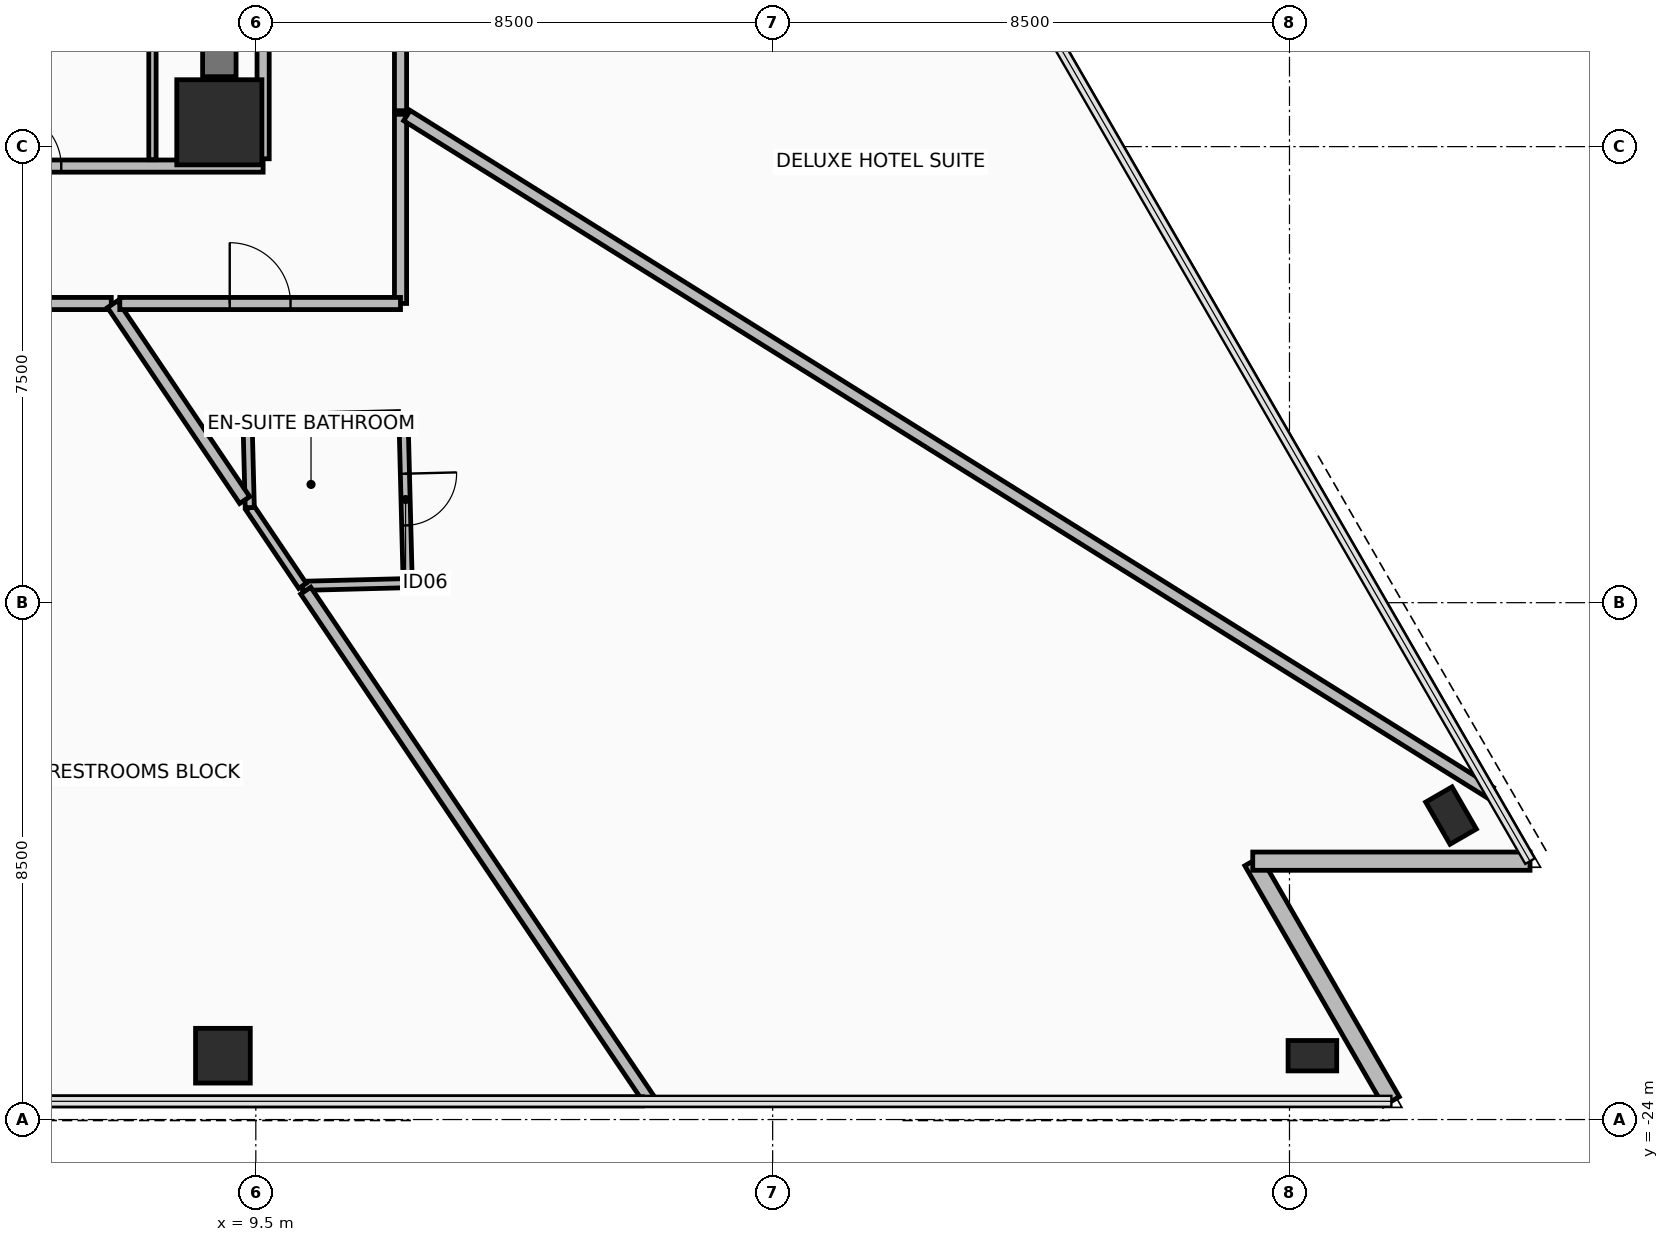
"""IFC4 building model, lengths in metres.
Left out: names, types, materials, properties, quantities, classifications, styles, units other than length and angle.
Written with IfcOpenShell. Run it as: python <this file> out.ifc"""

import sys

from ifc_helpers import new_model, si_unit, direction, frame, frame_2d, origin, origin_2d, place, context, subcontext, project, spatial, rectangle, hollow_rectangle, extrude, element, fill, save


model = new_model("IFC4")
c1 = context("Model", 3, precision=1e-05, world=origin(), true_north=direction((0.0, 1.0)))
c2 = subcontext(c1, "Body", "Model", "MODEL_VIEW")
j1 = project(units=[si_unit("LENGTHUNIT", "METRE"), si_unit("PLANEANGLEUNIT", "RADIAN")], contexts=[c1])
p1 = place(None, origin())
s1 = spatial("IfcSite", under=j1, at=p1, CompositionType="ELEMENT")
p2 = place(p1, origin())
s2 = spatial("IfcBuilding", under=s1, at=p2, CompositionType="ELEMENT")
p3 = place(p2, frame((0.0, 0.0, 35.25)))
s3 = spatial("IfcBuildingStorey", under=s2, at=p3, CompositionType="ELEMENT", Elevation=35.25)
p4 = place(p3, frame((8.9, -7.6, 0.0), z_axis=(0.0, 0.0, 1.0), x_axis=(1.0, 0.0, 0.0)))
e1 = element("IfcColumn", 1, at=p4, inside=s3, PredefinedType="COLUMN", context=c2, shape_type="SweptSolid", body=[
    extrude(rectangle(XDim=1.4, YDim=1.4, at=origin_2d()), origin(), (0.0, 0.0, 1.0), 3.4),
])
p5 = place(p3, frame((8.959, -22.95, 0.0), z_axis=(0.0, 0.0, 1.0), x_axis=(1.0, 0.0, 0.0)))
e2 = element("IfcColumn", 2, at=p5, inside=s3, PredefinedType="COLUMN", context=c2, shape_type="SweptSolid", body=[
    extrude(hollow_rectangle(XDim=0.9, YDim=0.9, WallThickness=0.05, at=origin_2d()), origin(), (0.0, 0.0, 1.0), 3.4),
])
for number, where, z_axis, x_axis in (
    (3, (26.877, -22.95, 0.0), (0.0, 0.0, 1.0), (1.0, 0.0, 0.0)),
    (4, (29.157, -19.001, 0.0), (0.0, 0.0, 1.0), (-0.5, 0.866, 0.0)),
):
    element("IfcColumn", number, at=place(p3, frame(where, z_axis=z_axis, x_axis=x_axis)), inside=s3, PredefinedType="COLUMN", context=c2, shape_type="SweptSolid", body=[
        extrude(hollow_rectangle(XDim=0.5, YDim=0.8, WallThickness=0.04, at=origin_2d()), origin(), (0.0, 0.0, 1.0), 3.4),
    ])
p6 = place(p3, frame((28.176, -23.7, 0.0), z_axis=(0.0, 0.0, 1.0), x_axis=(-0.500014431597, 0.866017071537, 0.0)))
e5 = element("IfcWall", 5, at=p6, inside=s3, PredefinedType="STANDARD", context=c2, shape_type="SweptSolid", body=[
    extrude(rectangle(XDim=4.56, YDim=0.3, at=frame_2d((2.28, 0.0))), origin(), (0.0, 0.0, 1.0), 2.42),
])
p7 = place(p3, frame((25.896, -19.751, 0.0), z_axis=(0.0, 0.0, 1.0), x_axis=(1.0, 0.0, 0.0)))
e6 = element("IfcWall", 6, at=p7, inside=s3, PredefinedType="STANDARD", context=c2, shape_type="SweptSolid", body=[
    extrude(rectangle(XDim=4.56, YDim=0.3, at=frame_2d((2.28, 0.0))), origin(), (0.0, 0.0, 1.0), 2.42),
])
p8 = place(p3, frame((8.9, -6.85, 0.0), z_axis=(0.0, 0.0, 1.0), x_axis=(0.0, 1.0, 0.0)))
e7 = element("IfcWall", 7, at=p8, inside=s3, PredefinedType="SHEAR", context=c2, shape_type="SweptSolid", body=[
    extrude(rectangle(XDim=10.7, YDim=0.55, at=frame_2d((5.35, 0.0))), origin(), (0.0, 0.0, 1.0), 3.225),
])
p9 = place(p3, frame((-9.62, -8.32, 0.0), z_axis=(0.0, 0.0, 1.0), x_axis=(1.0, 0.0, 0.0)))
e8 = element("IfcWall", 8, at=p9, inside=s3, PredefinedType="PARTITIONING", context=c2, shape_type="SweptSolid", body=[
    extrude(rectangle(XDim=19.24, YDim=0.2, at=frame_2d((9.62, 0.0))), origin(), (0.0, 0.0, 1.0), 2.62),
])
p10 = place(p9, frame((15.02, 0.0, 0.0)))
e9 = element("IfcOpeningElement", 9, at=p10, cuts=e8, PredefinedType="OPENING", context=c2, shape_type="SweptSolid", body=[
    extrude(rectangle(XDim=0.9, YDim=2.1, at=frame_2d((0.45, 1.05))), frame((0.0, 0.11, 0.0), z_axis=(0.0, -1.0, 0.0), x_axis=(1.0, 0.0, 0.0)), (0.0, 0.0, 1.0), 0.22),
])
p11 = place(p3, frame((9.62, -8.2, 0.0), z_axis=(0.0, 0.0, 1.0), x_axis=(0.0, 1.0, 0.0)))
e10 = element("IfcWall", 10, at=p11, inside=s3, PredefinedType="PARTITIONING", context=c2, shape_type="SweptSolid", body=[
    extrude(rectangle(XDim=16.4, YDim=0.2, at=frame_2d((8.2, 0.0))), origin(), (0.0, 0.0, 1.0), 2.62),
])
p12 = place(p11, frame((12.65, 0.0, 0.0)))
e11 = element("IfcOpeningElement", 11, at=p12, cuts=e10, PredefinedType="OPENING", context=c2, shape_type="SweptSolid", body=[
    extrude(rectangle(XDim=1.1, YDim=2.15, at=frame_2d((0.55, 1.075))), frame((0.0, 0.11, 0.0), z_axis=(0.0, -1.0, 0.0), x_axis=(1.0, 0.0, 0.0)), (0.0, 0.0, 1.0), 0.22),
])
p13 = place(p3, frame((7.8, -8.215, 0.0), z_axis=(0.0, 0.0, 1.0), x_axis=(0.0, 1.0, 0.0)))
e12 = element("IfcWall", 12, at=p13, inside=s3, PredefinedType="PARTITIONING", context=c2, shape_type="SweptSolid", body=[
    extrude(rectangle(XDim=4.015, YDim=0.12, at=frame_2d((2.008, 0.0))), origin(), (0.0, 0.0, 1.0), 2.42),
])
p14 = place(p3, frame((11.927, -12.429, 0.0), z_axis=(0.0, 0.0, 1.0), x_axis=(0.025746347005, -0.999668507864, 0.0)))
e13 = element("IfcWall", 13, at=p14, inside=s3, PredefinedType="PARTITIONING", context=c2, shape_type="SweptSolid", body=[
    extrude(rectangle(XDim=2.75, YDim=0.15, at=frame_2d((1.375, 0.0))), origin(), (0.0, 0.0, 1.0), 2.82),
])
p15 = place(p14, frame((0.95, 0.0, 0.0)))
e14 = element("IfcOpeningElement", 14, at=p15, cuts=e13, PredefinedType="OPENING", context=c2, shape_type="SweptSolid", body=[
    extrude(rectangle(XDim=0.85, YDim=2.1, at=frame_2d((0.425, 1.05))), frame((0.0, 0.085, 0.0), z_axis=(0.0, -1.0, 0.0), x_axis=(1.0, 0.0, 0.0)), (0.0, 0.0, 1.0), 0.17),
])
p16 = place(p3, frame((11.998, -15.178, 0.0), z_axis=(0.0, 0.0, 1.0), x_axis=(-0.999670410654, -0.025672359918, 0.0)))
e15 = element("IfcWall", 15, at=p16, inside=s3, PredefinedType="PARTITIONING", context=c2, shape_type="SweptSolid", body=[
    extrude(rectangle(XDim=1.731, YDim=0.15, at=frame_2d((0.865, 0.0))), origin(), (0.0, 0.0, 1.0), 3.225),
])
p17 = place(p3, frame((10.268, -15.223, 0.0), z_axis=(0.0, 0.0, 1.0), x_axis=(-0.559229675695, 0.82901276819, 0.0)))
e16 = element("IfcWall", 16, at=p17, inside=s3, PredefinedType="PARTITIONING", context=c2, shape_type="SweptSolid", body=[
    extrude(rectangle(XDim=1.552, YDim=0.15, at=frame_2d((0.776, 0.0))), origin(), (0.0, 0.0, 1.0), 2.82),
])
p18 = place(p3, frame((9.4, -13.936, 0.0), z_axis=(0.0, 0.0, 1.0), x_axis=(-0.025745445057, 0.999668531094, 0.0)))
e17 = element("IfcWall", 17, at=p18, inside=s3, PredefinedType="PARTITIONING", context=c2, shape_type="SweptSolid", body=[
    extrude(rectangle(XDim=1.441, YDim=0.15, at=frame_2d((0.721, 0.0))), origin(), (0.0, 0.0, 1.0), 3.225),
])
p19 = place(p3, frame((9.443, -12.493, 0.0), z_axis=(0.0, 0.0, 1.0), x_axis=(0.999667618691, 0.025780848324, 0.0)))
e18 = element("IfcWall", 18, at=p19, inside=s3, PredefinedType="PARTITIONING", context=c2, shape_type="SweptSolid", body=[
    extrude(rectangle(XDim=2.405, YDim=0.15, at=frame_2d((1.203, 0.0))), origin(), (0.0, 0.0, 1.0), 3.225),
])
p20 = place(p3, frame((1.516, -10.58, 0.0), z_axis=(0.0, 0.0, 1.0), x_axis=(1.0, 0.0, 0.0)))
e19 = element("IfcWall", 19, at=p20, inside=s3, PredefinedType="PARTITIONING", context=c2, shape_type="SweptSolid", body=[
    extrude(rectangle(XDim=5.607, YDim=0.2, at=frame_2d((2.804, 0.0))), origin(), (0.0, 0.0, 1.0), 3.225),
])
p21 = place(p20, frame((2.379, 0.0, 0.0)))
e20 = element("IfcOpeningElement", 20, at=p21, cuts=e19, PredefinedType="OPENING", context=c2, shape_type="SweptSolid", body=[
    extrude(rectangle(XDim=0.85, YDim=2.1, at=frame_2d((0.425, 1.05))), frame((0.0, 0.11, 0.0), z_axis=(0.0, -1.0, 0.0), x_axis=(1.0, 0.0, 0.0)), (0.0, 0.0, 1.0), 0.22),
])
p22 = place(p3, frame((7.144, -10.591, 0.0), z_axis=(0.0, 0.0, 1.0), x_axis=(0.559171794076, -0.829051810631, 0.0)))
e21 = element("IfcWall", 21, at=p22, inside=s3, PredefinedType="PARTITIONING", context=c2, shape_type="SweptSolid", body=[
    extrude(rectangle(XDim=3.886, YDim=0.2, at=frame_2d((1.943, 0.0))), origin(), (0.0, 0.0, 1.0), 2.62),
])
p23 = place(p3, frame((10.321, -15.302, 0.0), z_axis=(0.0, 0.0, 1.0), x_axis=(0.559202536063, -0.829031075208, 0.0)))
e22 = element("IfcWall", 22, at=p23, inside=s3, PredefinedType="PARTITIONING", context=c2, shape_type="SweptSolid", body=[
    extrude(rectangle(XDim=10.13, YDim=0.2, at=frame_2d((5.065, 0.0))), origin(), (0.0, 0.0, 1.0), 2.42),
])
p24 = place(p3, frame((15.859, -23.7, 0.0), z_axis=(0.0, 0.0, 1.0), x_axis=(-1.0, 0.0, 0.0)))
e23 = element("IfcWall", 23, at=p24, inside=s3, PredefinedType="PARTITIONING", context=c2, shape_type="SweptSolid", body=[
    extrude(rectangle(XDim=12.507, YDim=0.15, at=frame_2d((6.253, 0.0))), origin(), (0.0, 0.0, 1.0), 3.225),
])
p25 = place(p3, frame((11.88, -10.579, 0.0), z_axis=(0.0, 0.0, 1.0), x_axis=(0.0, 1.0, 0.0)))
e24 = element("IfcWall", 24, at=p25, inside=s3, PredefinedType="PARTITIONING", context=c2, shape_type="SweptSolid", body=[
    extrude(rectangle(XDim=3.111, YDim=0.2, at=frame_2d((1.555, 0.0))), origin(), (0.0, 0.0, 1.0), 2.62),
])
p26 = place(p3, frame((11.985, -7.489, 0.0), z_axis=(0.0, 0.0, 1.0), x_axis=(0.848049879615, -0.529916410092, 0.0)))
e25 = element("IfcWall", 25, at=p26, inside=s3, PredefinedType="PARTITIONING", context=c2, shape_type="SweptSolid", body=[
    extrude(rectangle(XDim=21.007, YDim=0.2, at=frame_2d((10.504, 0.0))), origin(), (0.0, 0.0, 1.0), 2.42),
])
p27 = place(p3, frame((7.263, -10.58, 0.0), z_axis=(0.0, 0.0, 1.0), x_axis=(1.0, 0.0, 0.0)))
e26 = element("IfcWall", 26, at=p27, inside=s3, PredefinedType="PARTITIONING", context=c2, shape_type="SweptSolid", body=[
    extrude(rectangle(XDim=4.616, YDim=0.2, at=frame_2d((2.308, 0.0))), origin(), (0.0, 0.0, 1.0), 2.62),
])
p28 = place(p27, frame((1.808, 0.0, 0.0)))
e27 = element("IfcOpeningElement", 27, at=p28, cuts=e26, PredefinedType="OPENING", context=c2, shape_type="SweptSolid", body=[
    extrude(rectangle(XDim=1.0, YDim=2.15, at=frame_2d((0.5, 1.075))), frame((0.0, 0.11, 0.0), z_axis=(0.0, -1.0, 0.0), x_axis=(1.0, 0.0, 0.0)), (0.0, 0.0, 1.0), 0.22),
])
p29 = place(p3, frame((11.88, -7.41, 0.0), z_axis=(0.0, 0.0, 1.0), x_axis=(0.0, 1.0, 0.0)))
e28 = element("IfcWall", 28, at=p29, inside=s3, PredefinedType="PARTITIONING", context=c2, shape_type="SweptSolid", body=[
    extrude(rectangle(XDim=5.285, YDim=0.2, at=frame_2d((2.643, 0.0))), origin(), (0.0, 0.0, 1.0), 2.62),
])
p30 = place(p29, frame((2.143, 0.0, 0.0)))
e29 = element("IfcOpeningElement", 29, at=p30, cuts=e28, PredefinedType="OPENING", context=c2, shape_type="SweptSolid", body=[
    extrude(rectangle(XDim=1.0, YDim=2.15, at=frame_2d((0.5, 1.075))), frame((0.0, 0.11, 0.0), z_axis=(0.0, -1.0, 0.0), x_axis=(1.0, 0.0, 0.0)), (0.0, 0.0, 1.0), 0.22),
])
p31 = place(p10, origin())
e30 = element("IfcDoor", 30, at=p31, inside=s3, OperationType="SINGLE_SWING_LEFT", PredefinedType="DOOR", context=c2, shape_type="SweptSolid", body=[
    extrude(rectangle(XDim=0.9, YDim=2.1, at=frame_2d((0.45, 1.05))), frame((0.0, 0.025, 0.0), z_axis=(0.0, -1.0, 0.0), x_axis=(1.0, 0.0, 0.0)), (0.0, 0.0, 1.0), 0.05),
])
fill(e9, e30)
p32 = place(p15, origin())
e31 = element("IfcDoor", 31, at=p32, inside=s3, OperationType="SINGLE_SWING_RIGHT", PredefinedType="DOOR", context=c2, shape_type="SweptSolid", body=[
    extrude(rectangle(XDim=0.85, YDim=2.1, at=frame_2d((0.425, 1.05))), frame((0.0, 0.025, 0.0), z_axis=(0.0, -1.0, 0.0), x_axis=(1.0, 0.0, 0.0)), (0.0, 0.0, 1.0), 0.05),
])
fill(e14, e31)
p33 = place(p28, origin())
e32 = element("IfcDoor", 32, at=p33, inside=s3, OperationType="SINGLE_SWING_LEFT", PredefinedType="DOOR", context=c2, shape_type="SweptSolid", body=[
    extrude(rectangle(XDim=1.0, YDim=2.15, at=frame_2d((0.5, 1.075))), frame((0.0, 0.025, 0.0), z_axis=(0.0, -1.0, 0.0), x_axis=(1.0, 0.0, 0.0)), (0.0, 0.0, 1.0), 0.05),
])
fill(e27, e32)
save(model, sys.argv[1])
